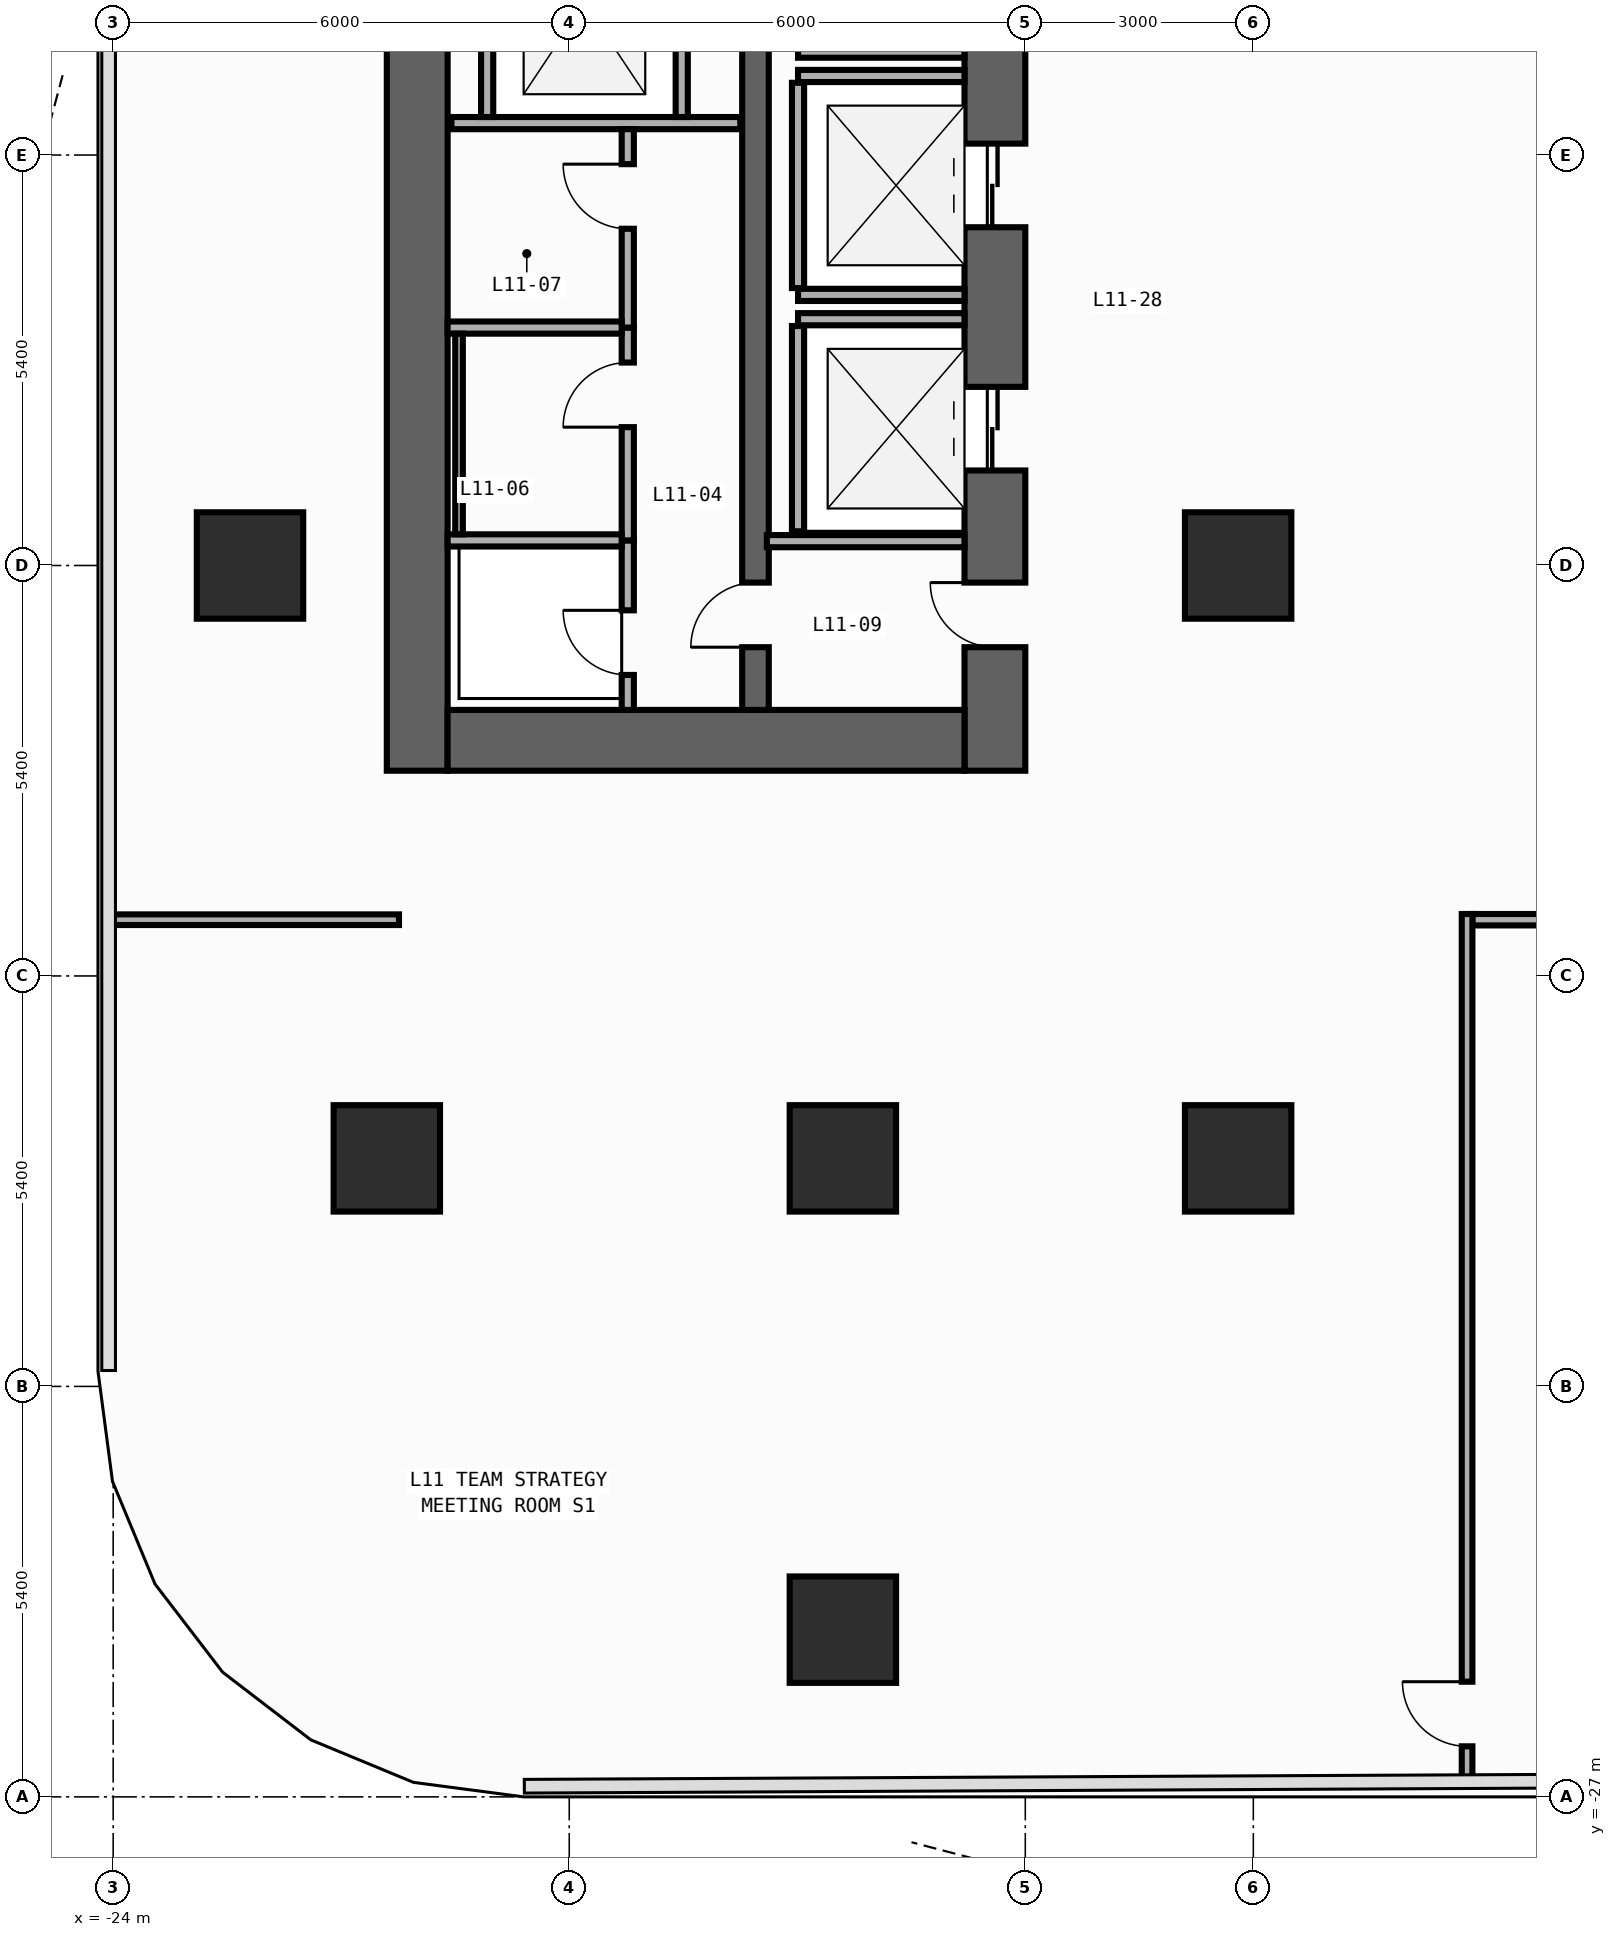
"""IFC4 building model, lengths in metres.
Left out: names, types, materials, properties, quantities, classifications, styles, units other than length and angle.
Written with IfcOpenShell. Run it as: python <this file> out.ifc"""

import sys

from ifc_helpers import new_model, si_unit, direction, frame, frame_2d, origin, origin_2d, place, context, subcontext, project, spatial, rectangle, extrude, element, fill, save


model = new_model("IFC4")
c1 = context("Model", 3, precision=1e-05, world=origin(), true_north=direction((0.0, 1.0)))
c2 = subcontext(c1, "Body", "Model", "MODEL_VIEW")
j1 = project(units=[si_unit("LENGTHUNIT", "METRE"), si_unit("PLANEANGLEUNIT", "RADIAN")], contexts=[c1])
p1 = place(None, origin())
s1 = spatial("IfcSite", under=j1, at=p1, CompositionType="ELEMENT")
p2 = place(p1, origin())
s2 = spatial("IfcBuilding", under=s1, at=p2, CompositionType="ELEMENT")
p3 = place(p2, frame((0.0, 0.0, 47.0)))
s3 = spatial("IfcBuildingStorey", under=s2, at=p3, CompositionType="ELEMENT", Elevation=47.0)
p4 = place(p3, frame((-20.0, -13.5, 0.0), z_axis=(0.0, 0.0, 1.0), x_axis=(0.0, 1.0, 0.0)))
e1 = element("IfcWall", 1, at=p4, inside=s3, PredefinedType="SHEAR", context=c2, shape_type="SweptSolid", body=[
    extrude(rectangle(XDim=27.0, YDim=0.8, at=frame_2d((13.5, 0.0))), origin(), (0.0, 0.0, 1.0), 3.94),
])
p5 = place(p3, frame((-12.4, -13.5, 0.0), z_axis=(0.0, 0.0, 1.0), x_axis=(0.0, 1.0, 0.0)))
e2 = element("IfcWall", 2, at=p5, inside=s3, PredefinedType="SHEAR", context=c2, shape_type="SweptSolid", body=[
    extrude(rectangle(XDim=27.0, YDim=0.8, at=frame_2d((13.5, 0.0))), origin(), (0.0, 0.0, 1.0), 3.94),
])
p6 = place(p5, frame((21.55, 0.0, 0.0)))
e3 = element("IfcOpeningElement", 3, at=p6, cuts=e2, PredefinedType="OPENING", context=c2, shape_type="SweptSolid", body=[
    extrude(rectangle(XDim=1.1, YDim=2.2, at=frame_2d((0.55, 1.1))), frame((0.0, 0.41, 0.0), z_axis=(0.0, -1.0, 0.0), x_axis=(1.0, 0.0, 0.0)), (0.0, 0.0, 1.0), 0.82),
])
p7 = place(p5, frame((18.35, 0.0, 0.0)))
e4 = element("IfcOpeningElement", 4, at=p7, cuts=e2, PredefinedType="OPENING", context=c2, shape_type="SweptSolid", body=[
    extrude(rectangle(XDim=1.1, YDim=2.2, at=frame_2d((0.55, 1.1))), frame((0.0, 0.41, 0.0), z_axis=(0.0, -1.0, 0.0), x_axis=(1.0, 0.0, 0.0)), (0.0, 0.0, 1.0), 0.82),
])
p8 = place(p5, frame((15.15, 0.0, 0.0)))
e5 = element("IfcOpeningElement", 5, at=p8, cuts=e2, PredefinedType="OPENING", context=c2, shape_type="SweptSolid", body=[
    extrude(rectangle(XDim=1.1, YDim=2.2, at=frame_2d((0.55, 1.1))), frame((0.0, 0.41, 0.0), z_axis=(0.0, -1.0, 0.0), x_axis=(1.0, 0.0, 0.0)), (0.0, 0.0, 1.0), 0.82),
])
p9 = place(p5, frame((10.35, 0.0, 0.0)))
e6 = element("IfcOpeningElement", 6, at=p9, cuts=e2, PredefinedType="OPENING", context=c2, shape_type="SweptSolid", body=[
    extrude(rectangle(XDim=1.1, YDim=2.2, at=frame_2d((0.55, 1.1))), frame((0.0, 0.41, 0.0), z_axis=(0.0, -1.0, 0.0), x_axis=(1.0, 0.0, 0.0)), (0.0, 0.0, 1.0), 0.82),
])
p10 = place(p5, frame((7.15, 0.0, 0.0)))
e7 = element("IfcOpeningElement", 7, at=p10, cuts=e2, PredefinedType="OPENING", context=c2, shape_type="SweptSolid", body=[
    extrude(rectangle(XDim=1.1, YDim=2.2, at=frame_2d((0.55, 1.1))), frame((0.0, 0.41, 0.0), z_axis=(0.0, -1.0, 0.0), x_axis=(1.0, 0.0, 0.0)), (0.0, 0.0, 1.0), 0.82),
])
p11 = place(p5, frame((3.95, 0.0, 0.0)))
e8 = element("IfcOpeningElement", 8, at=p11, cuts=e2, PredefinedType="OPENING", context=c2, shape_type="SweptSolid", body=[
    extrude(rectangle(XDim=1.1, YDim=2.2, at=frame_2d((0.55, 1.1))), frame((0.0, 0.41, 0.0), z_axis=(0.0, -1.0, 0.0), x_axis=(1.0, 0.0, 0.0)), (0.0, 0.0, 1.0), 0.82),
])
p12 = place(p5, frame((12.725, 0.0, 0.0)))
e9 = element("IfcOpeningElement", 9, at=p12, cuts=e2, PredefinedType="OPENING", context=c2, shape_type="SweptSolid", body=[
    extrude(rectangle(XDim=1.15, YDim=2.2, at=frame_2d((0.575, 1.1))), frame((0.0, 0.41, 0.0), z_axis=(0.0, -1.0, 0.0), x_axis=(1.0, 0.0, 0.0)), (0.0, 0.0, 1.0), 0.82),
])
p13 = place(p5, frame((1.625, 0.0, 0.0)))
e10 = element("IfcOpeningElement", 10, at=p13, cuts=e2, PredefinedType="OPENING", context=c2, shape_type="SweptSolid", body=[
    extrude(rectangle(XDim=0.85, YDim=2.1, at=frame_2d((0.425, 1.05))), frame((0.0, 0.41, 0.0), z_axis=(0.0, -1.0, 0.0), x_axis=(1.0, 0.0, 0.0)), (0.0, 0.0, 1.0), 0.82),
])
p14 = place(p3, frame((-19.6, -13.1, 0.0), z_axis=(0.0, 0.0, 1.0), x_axis=(1.0, 0.0, 0.0)))
e11 = element("IfcWall", 11, at=p14, inside=s3, PredefinedType="SHEAR", context=c2, shape_type="SweptSolid", body=[
    extrude(rectangle(XDim=6.8, YDim=0.8, at=frame_2d((3.4, 0.0))), origin(), (0.0, 0.0, 1.0), 3.94),
])
p15 = place(p3, frame((-15.55, -12.7, 0.0), z_axis=(0.0, 0.0, 1.0), x_axis=(0.0, 1.0, 0.0)))
e12 = element("IfcWall", 12, at=p15, inside=s3, PredefinedType="SHEAR", context=c2, shape_type="SweptSolid", body=[
    extrude(rectangle(XDim=25.4, YDim=0.35, at=frame_2d((12.7, 0.0))), origin(), (0.0, 0.0, 1.0), 3.94),
])
p16 = place(p15, frame((11.925, 0.0, 0.0)))
e13 = element("IfcOpeningElement", 13, at=p16, cuts=e12, PredefinedType="OPENING", context=c2, shape_type="SweptSolid", body=[
    extrude(rectangle(XDim=1.15, YDim=2.2, at=frame_2d((0.575, 1.1))), frame((0.0, 0.185, 0.0), z_axis=(0.0, -1.0, 0.0), x_axis=(1.0, 0.0, 0.0)), (0.0, 0.0, 1.0), 0.37),
])
p17 = place(p15, frame((0.825, 0.0, 0.0)))
e14 = element("IfcOpeningElement", 14, at=p17, cuts=e12, PredefinedType="OPENING", context=c2, shape_type="SweptSolid", body=[
    extrude(rectangle(XDim=0.85, YDim=2.1, at=frame_2d((0.425, 1.05))), frame((0.0, 0.185, 0.0), z_axis=(0.0, -1.0, 0.0), x_axis=(1.0, 0.0, 0.0)), (0.0, 0.0, 1.0), 0.37),
])
for number, where, z_axis, x_axis in (
    (15, (-9.2, -18.6, 0.0), (0.0, 0.0, 1.0), (1.0, 0.0, 0.0)),
    (16, (-9.2, -10.8, 0.0), (0.0, 0.0, 1.0), (1.0, 0.0, 0.0)),
    (17, (-20.4, -18.6, 0.0), (0.0, 0.0, 1.0), (1.0, 0.0, 0.0)),
    (18, (-14.4, -18.6, 0.0), (0.0, 0.0, 1.0), (1.0, 0.0, 0.0)),
    (19, (-22.2, -10.8, 0.0), (0.0, 0.0, 1.0), (1.0, 0.0, 0.0)),
    (20, (-14.4, -24.8, 0.0), (0.0, 0.0, 1.0), (1.0, 0.0, 0.0)),
):
    element("IfcColumn", number, at=place(p3, frame(where, z_axis=z_axis, x_axis=x_axis)), inside=s3, PredefinedType="COLUMN", context=c2, shape_type="SweptSolid", body=[
        extrude(rectangle(XDim=1.4, YDim=1.4, at=origin_2d()), origin(), (0.0, 0.0, 1.0), 4.2),
    ])
for number, where, z_axis, x_axis in (
    (21, (-14.99, -4.04, 0.0), (0.0, 0.0, 1.0), (1.0, 0.0, 0.0)),
    (22, (-14.99, -7.24, 0.0), (0.0, 0.0, 1.0), (1.0, 0.0, 0.0)),
    (23, (-14.99, -4.36, 0.0), (0.0, 0.0, 1.0), (1.0, 0.0, 0.0)),
):
    element("IfcWall", number, at=place(p3, frame(where, z_axis=z_axis, x_axis=x_axis)), inside=s3, PredefinedType="STANDARD", context=c2, shape_type="SweptSolid", body=[
        extrude(rectangle(XDim=2.19, YDim=0.16, at=frame_2d((1.095, 0.0))), origin(), (0.0, 0.0, 1.0), 3.94),
    ])
p18 = place(p3, frame((-14.99, -7.15, 0.0), z_axis=(0.0, 0.0, 1.0), x_axis=(0.0, 1.0, 0.0)))
e24 = element("IfcWall", 24, at=p18, inside=s3, PredefinedType="STANDARD", context=c2, shape_type="SweptSolid", body=[
    extrude(rectangle(XDim=2.7, YDim=0.16, at=frame_2d((1.35, 0.0))), origin(), (0.0, 0.0, 1.0), 3.94),
])
p19 = place(p3, frame((-14.99, -7.56, 0.0), z_axis=(0.0, 0.0, 1.0), x_axis=(1.0, 0.0, 0.0)))
e25 = element("IfcWall", 25, at=p19, inside=s3, PredefinedType="STANDARD", context=c2, shape_type="SweptSolid", body=[
    extrude(rectangle(XDim=2.19, YDim=0.16, at=frame_2d((1.095, 0.0))), origin(), (0.0, 0.0, 1.0), 3.94),
])
p20 = place(p3, frame((-14.99, -10.35, 0.0), z_axis=(0.0, 0.0, 1.0), x_axis=(0.0, 1.0, 0.0)))
e26 = element("IfcWall", 26, at=p20, inside=s3, PredefinedType="STANDARD", context=c2, shape_type="SweptSolid", body=[
    extrude(rectangle(XDim=2.7, YDim=0.16, at=frame_2d((1.35, 0.0))), origin(), (0.0, 0.0, 1.0), 3.94),
])
p21 = place(p3, frame((-19.55, -4.98, 0.0), z_axis=(0.0, 0.0, 1.0), x_axis=(1.0, 0.0, 0.0)))
e27 = element("IfcWall", 27, at=p21, inside=s3, PredefinedType="STANDARD", context=c2, shape_type="SweptSolid", body=[
    extrude(rectangle(XDim=3.8, YDim=0.16, at=frame_2d((1.9, 0.0))), origin(), (0.0, 0.0, 1.0), 3.94),
])
for number, where, z_axis, x_axis in (
    (28, (-19.08, -4.9, 0.0), (0.0, 0.0, 1.0), (0.0, 1.0, 0.0)),
    (29, (-16.52, -4.9, 0.0), (0.0, 0.0, 1.0), (0.0, 1.0, 0.0)),
):
    element("IfcWall", number, at=place(p3, frame(where, z_axis=z_axis, x_axis=x_axis)), inside=s3, PredefinedType="STANDARD", context=c2, shape_type="SweptSolid", body=[
        extrude(rectangle(XDim=2.96, YDim=0.16, at=frame_2d((1.48, 0.0))), origin(), (0.0, 0.0, 1.0), 3.94),
    ])
p22 = place(p3, frame((-15.4, -10.48, 0.0), z_axis=(0.0, 0.0, 1.0), x_axis=(1.0, 0.0, 0.0)))
e30 = element("IfcWall", 30, at=p22, inside=s3, PredefinedType="STANDARD", context=c2, shape_type="SweptSolid", body=[
    extrude(rectangle(XDim=2.6, YDim=0.16, at=frame_2d((1.3, 0.0))), origin(), (0.0, 0.0, 1.0), 3.94),
])
p23 = place(p3, frame((-17.23, -12.7, 0.0), z_axis=(0.0, 0.0, 1.0), x_axis=(0.0, 1.0, 0.0)))
e31 = element("IfcWall", 31, at=p23, inside=s3, PredefinedType="PARTITIONING", context=c2, shape_type="SweptSolid", body=[
    extrude(rectangle(XDim=2.23, YDim=0.16, at=frame_2d((1.115, 0.0))), origin(), (0.0, 0.0, 1.0), 3.94),
])
p24 = place(p23, frame((0.46, 0.0, 0.0)))
e32 = element("IfcOpeningElement", 32, at=p24, cuts=e31, PredefinedType="OPENING", context=c2, shape_type="SweptSolid", body=[
    extrude(rectangle(XDim=0.85, YDim=2.1, at=frame_2d((0.425, 1.05))), frame((0.0, 0.09, 0.0), z_axis=(0.0, -1.0, 0.0), x_axis=(1.0, 0.0, 0.0)), (0.0, 0.0, 1.0), 0.18),
])
p25 = place(p3, frame((-17.23, -10.47, 0.0), z_axis=(0.0, 0.0, 1.0), x_axis=(0.0, 1.0, 0.0)))
e33 = element("IfcWall", 33, at=p25, inside=s3, PredefinedType="PARTITIONING", context=c2, shape_type="SweptSolid", body=[
    extrude(rectangle(XDim=2.8, YDim=0.16, at=frame_2d((1.4, 0.0))), origin(), (0.0, 0.0, 1.0), 3.94),
])
p26 = place(p25, frame((1.49, 0.0, 0.0)))
e34 = element("IfcOpeningElement", 34, at=p26, cuts=e33, PredefinedType="OPENING", context=c2, shape_type="SweptSolid", body=[
    extrude(rectangle(XDim=0.85, YDim=2.1, at=frame_2d((0.425, 1.05))), frame((0.0, 0.09, 0.0), z_axis=(0.0, -1.0, 0.0), x_axis=(1.0, 0.0, 0.0)), (0.0, 0.0, 1.0), 0.18),
])
p27 = place(p3, frame((-17.23, -7.67, 0.0), z_axis=(0.0, 0.0, 1.0), x_axis=(0.0, 1.0, 0.0)))
e35 = element("IfcWall", 35, at=p27, inside=s3, PredefinedType="PARTITIONING", context=c2, shape_type="SweptSolid", body=[
    extrude(rectangle(XDim=2.61, YDim=0.16, at=frame_2d((1.305, 0.0))), origin(), (0.0, 0.0, 1.0), 3.94),
])
p28 = place(p27, frame((1.3, 0.0, 0.0)))
e36 = element("IfcOpeningElement", 36, at=p28, cuts=e35, PredefinedType="OPENING", context=c2, shape_type="SweptSolid", body=[
    extrude(rectangle(XDim=0.85, YDim=2.1, at=frame_2d((0.425, 1.05))), frame((0.0, 0.09, 0.0), z_axis=(0.0, -1.0, 0.0), x_axis=(1.0, 0.0, 0.0)), (0.0, 0.0, 1.0), 0.18),
])
for number, where, z_axis, x_axis in (
    (37, (-19.6, -10.47, 0.0), (0.0, 0.0, 1.0), (1.0, 0.0, 0.0)),
    (38, (-19.6, -7.67, 0.0), (0.0, 0.0, 1.0), (1.0, 0.0, 0.0)),
):
    element("IfcWall", number, at=place(p3, frame(where, z_axis=z_axis, x_axis=x_axis)), inside=s3, PredefinedType="PARTITIONING", context=c2, shape_type="SweptSolid", body=[
        extrude(rectangle(XDim=2.29, YDim=0.16, at=frame_2d((1.145, 0.0))), origin(), (0.0, 0.0, 1.0), 3.94),
    ])
p29 = place(p3, frame((-6.118, -15.46, 0.0), z_axis=(0.0, 0.0, 1.0), x_axis=(1.0, 0.0, 0.0)))
e39 = element("IfcWall", 39, at=p29, inside=s3, PredefinedType="PARTITIONING", context=c2, shape_type="SweptSolid", body=[
    extrude(rectangle(XDim=2.833, YDim=0.15, at=frame_2d((1.417, 0.0))), origin(), (0.0, 0.0, 1.0), 3.94),
])
p30 = place(p29, frame((1.473, 0.0, 0.0)))
e40 = element("IfcOpeningElement", 40, at=p30, cuts=e39, PredefinedType="OPENING", context=c2, shape_type="SweptSolid", body=[
    extrude(rectangle(XDim=0.9, YDim=2.15, at=frame_2d((0.45, 1.075))), frame((0.0, 0.085, 0.0), z_axis=(0.0, -1.0, 0.0), x_axis=(1.0, 0.0, 0.0)), (0.0, 0.0, 1.0), 0.17),
])
p31 = place(p3, frame((-24.055, -15.46, 0.0), z_axis=(0.0, 0.0, 1.0), x_axis=(1.0, 0.0, 0.0)))
e41 = element("IfcWall", 41, at=p31, inside=s3, PredefinedType="PARTITIONING", context=c2, shape_type="SweptSolid", body=[
    extrude(rectangle(XDim=3.815, YDim=0.14, at=frame_2d((1.907, 0.0))), origin(), (0.0, 0.0, 1.0), 3.94),
])
p32 = place(p3, frame((-6.188, -26.795, 0.0), z_axis=(0.0, 0.0, 1.0), x_axis=(0.0, 1.0, 0.0)))
e42 = element("IfcWall", 42, at=p32, inside=s3, PredefinedType="PARTITIONING", context=c2, shape_type="SweptSolid", body=[
    extrude(rectangle(XDim=11.41, YDim=0.14, at=frame_2d((5.705, 0.0))), origin(), (0.0, 0.0, 1.0), 3.94),
])
p33 = place(p32, frame((0.46, 0.0, 0.0)))
e43 = element("IfcOpeningElement", 43, at=p33, cuts=e42, PredefinedType="OPENING", context=c2, shape_type="SweptSolid", body=[
    extrude(rectangle(XDim=0.85, YDim=2.1, at=frame_2d((0.425, 1.05))), frame((0.0, 0.08, 0.0), z_axis=(0.0, -1.0, 0.0), x_axis=(1.0, 0.0, 0.0)), (0.0, 0.0, 1.0), 0.16),
])
p34 = place(p3, frame((-19.45, -10.39, 0.0), z_axis=(0.0, 0.0, 1.0), x_axis=(0.0, 1.0, 0.0)))
e44 = element("IfcWall", 44, at=p34, inside=s3, PredefinedType="PARTITIONING", context=c2, shape_type="SweptSolid", body=[
    extrude(rectangle(XDim=2.64, YDim=0.1, at=frame_2d((1.32, 0.0))), origin(), (0.0, 0.0, 1.0), 3.94),
])
p35 = place(p10, origin())
e45 = element("IfcDoor", 45, at=p35, inside=s3, OperationType="DOUBLE_DOOR_SLIDING", PredefinedType="DOOR", context=c2, shape_type="SweptSolid", body=[
    extrude(rectangle(XDim=1.1, YDim=2.2, at=frame_2d((0.55, 1.1))), frame((0.0, 0.025, 0.0), z_axis=(0.0, -1.0, 0.0), x_axis=(1.0, 0.0, 0.0)), (0.0, 0.0, 1.0), 0.05),
])
fill(e7, e45)
p36 = place(p11, origin())
e46 = element("IfcDoor", 46, at=p36, inside=s3, OperationType="DOUBLE_DOOR_SLIDING", PredefinedType="DOOR", context=c2, shape_type="SweptSolid", body=[
    extrude(rectangle(XDim=1.1, YDim=2.2, at=frame_2d((0.55, 1.1))), frame((0.0, 0.025, 0.0), z_axis=(0.0, -1.0, 0.0), x_axis=(1.0, 0.0, 0.0)), (0.0, 0.0, 1.0), 0.05),
])
fill(e8, e46)
p37 = place(p13, origin())
e47 = element("IfcDoor", 47, at=p37, inside=s3, OperationType="SINGLE_SWING_RIGHT", PredefinedType="DOOR", context=c2, shape_type="SweptSolid", body=[
    extrude(rectangle(XDim=0.85, YDim=2.1, at=frame_2d((0.425, 1.05))), frame((0.0, 0.025, 0.0), z_axis=(0.0, -1.0, 0.0), x_axis=(1.0, 0.0, 0.0)), (0.0, 0.0, 1.0), 0.05),
])
fill(e10, e47)
p38 = place(p17, origin())
e48 = element("IfcDoor", 48, at=p38, inside=s3, OperationType="SINGLE_SWING_LEFT", PredefinedType="DOOR", context=c2, shape_type="SweptSolid", body=[
    extrude(rectangle(XDim=0.85, YDim=2.1, at=frame_2d((0.425, 1.05))), frame((0.0, 0.025, 0.0), z_axis=(0.0, -1.0, 0.0), x_axis=(1.0, 0.0, 0.0)), (0.0, 0.0, 1.0), 0.05),
])
fill(e14, e48)
p39 = place(p24, origin())
e49 = element("IfcDoor", 49, at=p39, inside=s3, OperationType="SINGLE_SWING_RIGHT", PredefinedType="DOOR", context=c2, shape_type="SweptSolid", body=[
    extrude(rectangle(XDim=0.85, YDim=2.1, at=frame_2d((0.425, 1.05))), frame((0.0, 0.025, 0.0), z_axis=(0.0, -1.0, 0.0), x_axis=(1.0, 0.0, 0.0)), (0.0, 0.0, 1.0), 0.05),
])
fill(e32, e49)
p40 = place(p26, origin())
e50 = element("IfcDoor", 50, at=p40, inside=s3, OperationType="SINGLE_SWING_LEFT", PredefinedType="DOOR", context=c2, shape_type="SweptSolid", body=[
    extrude(rectangle(XDim=0.85, YDim=2.1, at=frame_2d((0.425, 1.05))), frame((0.0, 0.025, 0.0), z_axis=(0.0, -1.0, 0.0), x_axis=(1.0, 0.0, 0.0)), (0.0, 0.0, 1.0), 0.05),
])
fill(e34, e50)
p41 = place(p28, origin())
e51 = element("IfcDoor", 51, at=p41, inside=s3, OperationType="SINGLE_SWING_RIGHT", PredefinedType="DOOR", context=c2, shape_type="SweptSolid", body=[
    extrude(rectangle(XDim=0.85, YDim=2.1, at=frame_2d((0.425, 1.05))), frame((0.0, 0.025, 0.0), z_axis=(0.0, -1.0, 0.0), x_axis=(1.0, 0.0, 0.0)), (0.0, 0.0, 1.0), 0.05),
])
fill(e36, e51)
p42 = place(p33, origin())
e52 = element("IfcDoor", 52, at=p42, inside=s3, OperationType="SINGLE_SWING_RIGHT", PredefinedType="DOOR", context=c2, shape_type="SweptSolid", body=[
    extrude(rectangle(XDim=0.85, YDim=2.1, at=frame_2d((0.425, 1.05))), frame((0.0, 0.025, 0.0), z_axis=(0.0, -1.0, 0.0), x_axis=(1.0, 0.0, 0.0)), (0.0, 0.0, 1.0), 0.05),
])
fill(e43, e52)
save(model, sys.argv[1])
